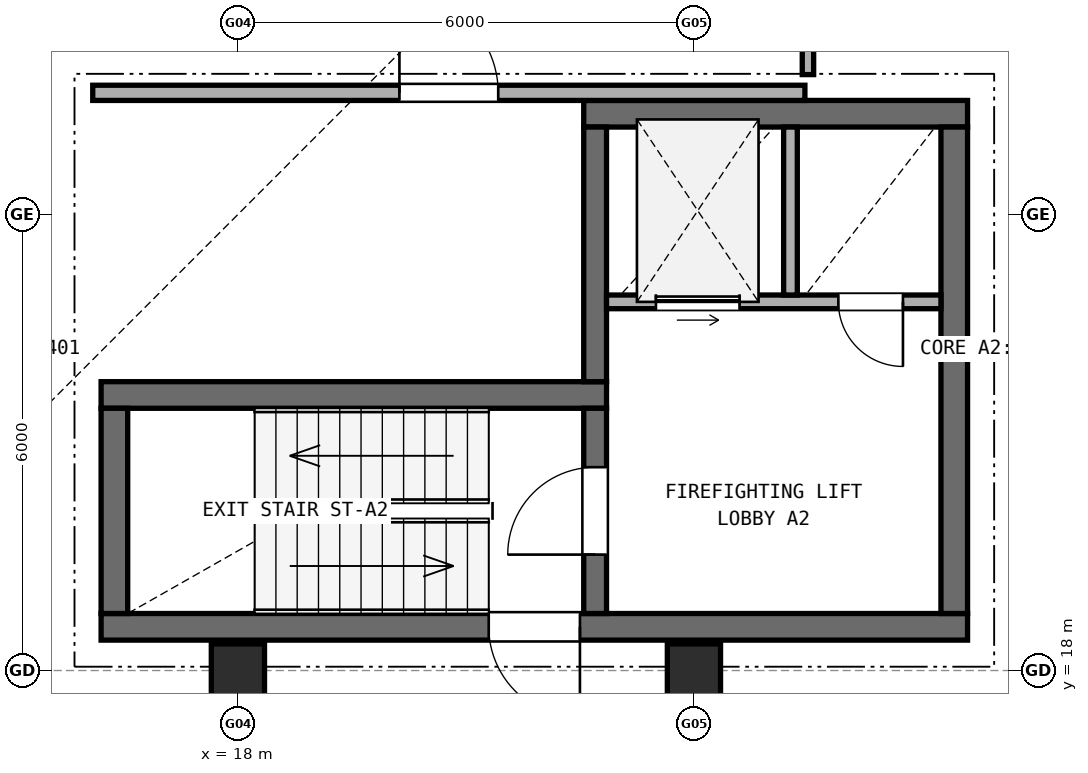
"""IFC4 building model, lengths in metres.
Left out: names, types, materials, properties, quantities, classifications, styles, units other than length and angle.
Written with IfcOpenShell. Run it as: python <this file> out.ifc"""

import sys

from ifc_helpers import new_model, si_unit, direction, frame, frame_2d, origin, origin_2d, place, context, subcontext, project, spatial, rectangle, extrude, element, fill, save


model = new_model("IFC4")
c1 = context("Model", 3, precision=1e-05, world=origin(), true_north=direction((0.0, 1.0)))
c2 = subcontext(c1, "Body", "Model", "MODEL_VIEW")
j1 = project(units=[si_unit("LENGTHUNIT", "METRE"), si_unit("PLANEANGLEUNIT", "RADIAN")], contexts=[c1])
p1 = place(None, origin())
s1 = spatial("IfcSite", under=j1, at=p1, CompositionType="ELEMENT")
p2 = place(p1, origin())
s2 = spatial("IfcBuilding", under=s1, at=p2, CompositionType="ELEMENT")
p3 = place(p2, origin())
s3 = spatial("IfcBuildingStorey", under=s2, at=p3, CompositionType="ELEMENT", Elevation=0.0)
for number, where, z_axis, x_axis in (
    (1, (18.0, 18.0, 0.0), (0.0, 0.0, 1.0), (1.0, 0.0, 0.0)),
    (2, (24.0, 18.0, 0.0), (0.0, 0.0, 1.0), (1.0, 0.0, 0.0)),
):
    element("IfcColumn", number, at=place(p3, frame(where, z_axis=z_axis, x_axis=x_axis)), inside=s3, PredefinedType="COLUMN", context=c2, shape_type="SweptSolid", body=[
        extrude(rectangle(XDim=0.7, YDim=0.7, at=origin_2d()), origin(), (0.0, 0.0, 1.0), 4.23),
    ])
p4 = place(p3, frame((16.2, 18.575, 0.0), z_axis=(0.0, 0.0, 1.0), x_axis=(1.0, 0.0, 0.0)))
e3 = element("IfcWall", 3, at=p4, inside=s3, PredefinedType="SHEAR", context=c2, shape_type="SweptSolid", body=[
    extrude(rectangle(XDim=11.4, YDim=0.35, at=frame_2d((5.7, 0.0))), origin(), (0.0, 0.0, 1.0), 4.23),
])
p5 = place(p4, frame((5.1, 0.0, 0.0)))
e4 = element("IfcOpeningElement", 4, at=p5, cuts=e3, PredefinedType="OPENING", context=c2, shape_type="SweptSolid", body=[
    extrude(rectangle(XDim=1.2, YDim=2.15, at=frame_2d((0.6, 1.075))), frame((0.0, 0.185, 0.0), z_axis=(0.0, -1.0, 0.0), x_axis=(1.0, 0.0, 0.0)), (0.0, 0.0, 1.0), 0.37),
])
p6 = place(p3, frame((22.85, 21.625, 0.0), z_axis=(0.0, 0.0, 1.0), x_axis=(-1.0, 0.0, 0.0)))
e5 = element("IfcWall", 5, at=p6, inside=s3, PredefinedType="SHEAR", context=c2, shape_type="SweptSolid", body=[
    extrude(rectangle(XDim=6.65, YDim=0.35, at=frame_2d((3.325, 0.0))), origin(), (0.0, 0.0, 1.0), 4.23),
])
p7 = place(p3, frame((16.375, 21.45, 0.0), z_axis=(0.0, 0.0, 1.0), x_axis=(0.0, -1.0, 0.0)))
e6 = element("IfcWall", 6, at=p7, inside=s3, PredefinedType="SHEAR", context=c2, shape_type="SweptSolid", body=[
    extrude(rectangle(XDim=2.7, YDim=0.35, at=frame_2d((1.35, 0.0))), origin(), (0.0, 0.0, 1.0), 4.23),
])
p8 = place(p3, frame((22.7, 18.75, 0.0), z_axis=(0.0, 0.0, 1.0), x_axis=(0.0, 1.0, 0.0)))
e7 = element("IfcWall", 7, at=p8, inside=s3, PredefinedType="SHEAR", context=c2, shape_type="SweptSolid", body=[
    extrude(rectangle(XDim=2.7, YDim=0.3, at=frame_2d((1.35, 0.0))), origin(), (0.0, 0.0, 1.0), 4.23),
])
p9 = place(p8, frame((0.775, 0.0, 0.0)))
e8 = element("IfcOpeningElement", 8, at=p9, cuts=e7, PredefinedType="OPENING", context=c2, shape_type="SweptSolid", body=[
    extrude(rectangle(XDim=1.15, YDim=2.15, at=frame_2d((0.575, 1.075))), frame((0.0, 0.16, 0.0), z_axis=(0.0, -1.0, 0.0), x_axis=(1.0, 0.0, 0.0)), (0.0, 0.0, 1.0), 0.32),
])
p10 = place(p3, frame((27.6, 25.325, 0.0), z_axis=(0.0, 0.0, 1.0), x_axis=(-1.0, 0.0, 0.0)))
e9 = element("IfcWall", 9, at=p10, inside=s3, PredefinedType="SHEAR", context=c2, shape_type="SweptSolid", body=[
    extrude(rectangle(XDim=5.05, YDim=0.35, at=frame_2d((2.525, 0.0))), origin(), (0.0, 0.0, 1.0), 4.23),
])
p11 = place(p3, frame((27.425, 18.75, 0.0), z_axis=(0.0, 0.0, 1.0), x_axis=(0.0, 1.0, 0.0)))
e10 = element("IfcWall", 10, at=p11, inside=s3, PredefinedType="SHEAR", context=c2, shape_type="SweptSolid", body=[
    extrude(rectangle(XDim=6.4, YDim=0.35, at=frame_2d((3.2, 0.0))), origin(), (0.0, 0.0, 1.0), 4.23),
])
p12 = place(p3, frame((22.7, 21.8, 0.0), z_axis=(0.0, 0.0, 1.0), x_axis=(0.0, 1.0, 0.0)))
e11 = element("IfcWall", 11, at=p12, inside=s3, PredefinedType="SHEAR", context=c2, shape_type="SweptSolid", body=[
    extrude(rectangle(XDim=3.35, YDim=0.3, at=frame_2d((1.675, 0.0))), origin(), (0.0, 0.0, 1.0), 4.23),
])
p13 = place(p3, frame((22.85, 22.85, 0.0), z_axis=(0.0, 0.0, 1.0), x_axis=(1.0, 0.0, 0.0)))
e12 = element("IfcWall", 12, at=p13, inside=s3, PredefinedType="SOLIDWALL", context=c2, shape_type="SweptSolid", body=[
    extrude(rectangle(XDim=4.4, YDim=0.18, at=frame_2d((2.2, 0.0))), origin(), (0.0, 0.0, 1.0), 4.23),
])
p14 = place(p13, frame((0.65, 0.0, 0.0)))
e13 = element("IfcOpeningElement", 13, at=p14, cuts=e12, PredefinedType="OPENING", context=c2, shape_type="SweptSolid", body=[
    extrude(rectangle(XDim=1.1, YDim=2.15, at=frame_2d((0.55, 1.075))), frame((0.0, 0.1, 0.0), z_axis=(0.0, -1.0, 0.0), x_axis=(1.0, 0.0, 0.0)), (0.0, 0.0, 1.0), 0.2),
])
p15 = place(p13, frame((3.05, 0.0, 0.0)))
e14 = element("IfcOpeningElement", 14, at=p15, cuts=e12, PredefinedType="OPENING", context=c2, shape_type="SweptSolid", body=[
    extrude(rectangle(XDim=0.85, YDim=2.1, at=frame_2d((0.425, 1.05))), frame((0.0, 0.1, 0.0), z_axis=(0.0, -1.0, 0.0), x_axis=(1.0, 0.0, 0.0)), (0.0, 0.0, 1.0), 0.2),
])
p16 = place(p3, frame((25.27, 22.94, 0.0), z_axis=(0.0, 0.0, 1.0), x_axis=(0.0, 1.0, 0.0)))
e15 = element("IfcWall", 15, at=p16, inside=s3, PredefinedType="SOLIDWALL", context=c2, shape_type="SweptSolid", body=[
    extrude(rectangle(XDim=2.21, YDim=0.18, at=frame_2d((1.105, 0.0))), origin(), (0.0, 0.0, 1.0), 4.23),
])
p17 = place(p3, frame((16.09, 25.6, 0.0), z_axis=(0.0, 0.0, 1.0), x_axis=(1.0, 0.0, 0.0)))
e16 = element("IfcWall", 16, at=p17, inside=s3, PredefinedType="SOLIDWALL", context=c2, shape_type="SweptSolid", body=[
    extrude(rectangle(XDim=9.37, YDim=0.2, at=frame_2d((4.685, 0.0))), origin(), (0.0, 0.0, 1.0), 4.23),
])
p18 = place(p17, frame((4.035, 0.0, 0.0)))
e17 = element("IfcOpeningElement", 17, at=p18, cuts=e16, PredefinedType="OPENING", context=c2, shape_type="SweptSolid", body=[
    extrude(rectangle(XDim=1.3, YDim=2.15, at=frame_2d((0.65, 1.075))), frame((0.0, 0.11, 0.0), z_axis=(0.0, -1.0, 0.0), x_axis=(1.0, 0.0, 0.0)), (0.0, 0.0, 1.0), 0.22),
])
p19 = place(p3, frame((25.5, 25.84, 0.0), z_axis=(0.0, 0.0, 1.0), x_axis=(0.0, 1.0, 0.0)))
e18 = element("IfcWall", 18, at=p19, inside=s3, PredefinedType="PARTITIONING", context=c2, shape_type="SweptSolid", body=[
    extrude(rectangle(XDim=15.72, YDim=0.15, at=frame_2d((7.86, 0.0))), origin(), (0.0, 0.0, 1.0), 3.112),
])
p20 = place(p19, frame((7.435, 0.0, 0.0)))
e19 = element("IfcOpeningElement", 19, at=p20, cuts=e18, PredefinedType="OPENING", context=c2, shape_type="SweptSolid", body=[
    extrude(rectangle(XDim=0.85, YDim=2.1, at=frame_2d((0.425, 1.05))), frame((0.0, 0.085, 0.0), z_axis=(0.0, -1.0, 0.0), x_axis=(1.0, 0.0, 0.0)), (0.0, 0.0, 1.0), 0.17),
])
p21 = place(p5, origin())
e20 = element("IfcDoor", 20, at=p21, inside=s3, OperationType="SINGLE_SWING_RIGHT", PredefinedType="DOOR", context=c2, shape_type="SweptSolid", body=[
    extrude(rectangle(XDim=1.2, YDim=2.15, at=frame_2d((0.6, 1.075))), frame((0.0, 0.025, 0.0), z_axis=(0.0, -1.0, 0.0), x_axis=(1.0, 0.0, 0.0)), (0.0, 0.0, 1.0), 0.05),
])
fill(e4, e20)
p22 = place(p9, origin())
e21 = element("IfcDoor", 21, at=p22, inside=s3, OperationType="SINGLE_SWING_LEFT", PredefinedType="DOOR", context=c2, shape_type="SweptSolid", body=[
    extrude(rectangle(XDim=1.15, YDim=2.15, at=frame_2d((0.575, 1.075))), frame((0.0, 0.025, 0.0), z_axis=(0.0, -1.0, 0.0), x_axis=(1.0, 0.0, 0.0)), (0.0, 0.0, 1.0), 0.05),
])
fill(e8, e21)
p23 = place(p14, origin())
e22 = element("IfcDoor", 22, at=p23, inside=s3, OperationType="SLIDING_TO_LEFT", PredefinedType="DOOR", context=c2, shape_type="SweptSolid", body=[
    extrude(rectangle(XDim=1.1, YDim=2.15, at=frame_2d((0.55, 1.075))), frame((0.0, 0.025, 0.0), z_axis=(0.0, -1.0, 0.0), x_axis=(1.0, 0.0, 0.0)), (0.0, 0.0, 1.0), 0.05),
])
fill(e13, e22)
p24 = place(p15, frame((0.85, 0.0, 0.0), z_axis=(0.0, 0.0, 1.0), x_axis=(-1.0, 0.0, 0.0)))
e23 = element("IfcDoor", 23, at=p24, inside=s3, OperationType="SINGLE_SWING_RIGHT", PredefinedType="DOOR", context=c2, shape_type="SweptSolid", body=[
    extrude(rectangle(XDim=0.85, YDim=2.1, at=frame_2d((0.425, 1.05))), frame((0.0, 0.025, 0.0), z_axis=(0.0, -1.0, 0.0), x_axis=(1.0, 0.0, 0.0)), (0.0, 0.0, 1.0), 0.05),
])
fill(e14, e23)
p25 = place(p18, origin())
e24 = element("IfcDoor", 24, at=p25, inside=s3, OperationType="SINGLE_SWING_LEFT", PredefinedType="DOOR", context=c2, shape_type="SweptSolid", body=[
    extrude(rectangle(XDim=1.3, YDim=2.15, at=frame_2d((0.65, 1.075))), frame((0.0, 0.025, 0.0), z_axis=(0.0, -1.0, 0.0), x_axis=(1.0, 0.0, 0.0)), (0.0, 0.0, 1.0), 0.05),
])
fill(e17, e24)
save(model, sys.argv[1])
